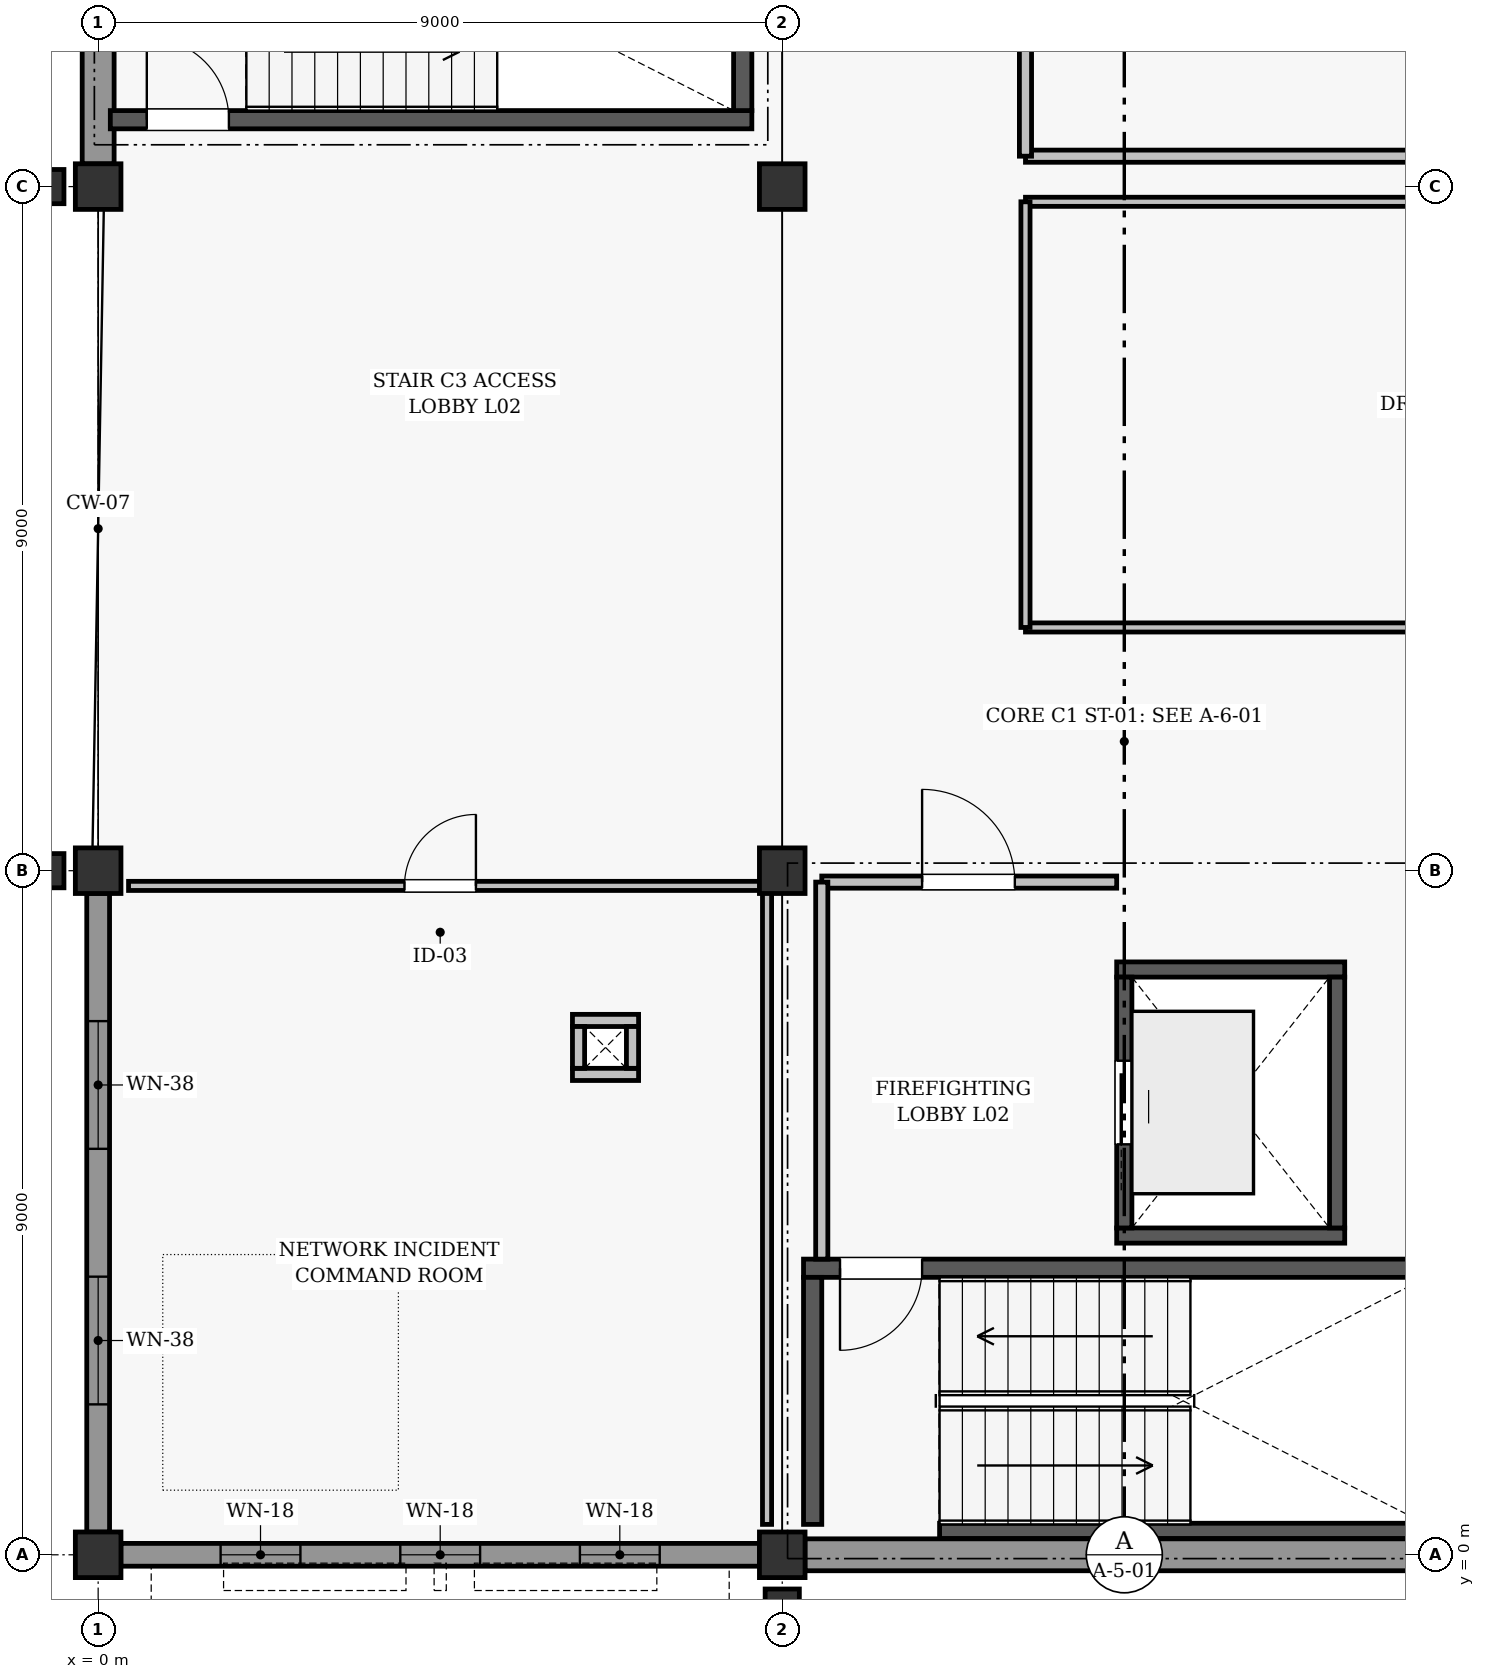
"""IFC4 building model, lengths in metres.
Left out: names, types, materials, properties, quantities, classifications, styles, units other than length and angle.
Written with IfcOpenShell. Run it as: python <this file> out.ifc"""

import sys

from ifc_helpers import new_model, si_unit, direction, frame, frame_2d, origin, origin_2d, place, context, subcontext, project, spatial, rectangle, extrude, element, fill, save


model = new_model("IFC4")
c1 = context("Model", 3, precision=1e-05, world=origin(), true_north=direction((0.0, 1.0)))
c2 = subcontext(c1, "Body", "Model", "MODEL_VIEW")
j1 = project(units=[si_unit("LENGTHUNIT", "METRE"), si_unit("PLANEANGLEUNIT", "RADIAN")], contexts=[c1])
p1 = place(None, origin())
s1 = spatial("IfcSite", under=j1, at=p1, CompositionType="ELEMENT")
p2 = place(p1, origin())
s2 = spatial("IfcBuilding", under=s1, at=p2, CompositionType="ELEMENT")
p3 = place(p2, frame((0.0, 0.0, 8.4)))
s3 = spatial("IfcBuildingStorey", under=s2, at=p3, CompositionType="ELEMENT", Elevation=8.4)
for number, where, z_axis, x_axis in (
    (1, (0.0, 0.0, 0.0), (0.0, 0.0, 1.0), (1.0, 0.0, 0.0)),
    (2, (0.0, 9.0, 0.0), (0.0, 0.0, 1.0), (1.0, 0.0, 0.0)),
    (3, (0.0, 18.0, 0.0), (0.0, 0.0, 1.0), (1.0, 0.0, 0.0)),
    (4, (9.0, 0.0, 0.0), (0.0, 0.0, 1.0), (1.0, 0.0, 0.0)),
    (5, (9.0, 9.0, 0.0), (0.0, 0.0, 1.0), (1.0, 0.0, 0.0)),
    (6, (9.0, 18.0, 0.0), (0.0, 0.0, 1.0), (1.0, 0.0, 0.0)),
):
    element("IfcColumn", number, at=place(p3, frame(where, z_axis=z_axis, x_axis=x_axis)), inside=s3, PredefinedType="COLUMN", context=c2, shape_type="SweptSolid", body=[
        extrude(rectangle(XDim=0.6, YDim=0.6, at=origin_2d()), origin(), (0.0, 0.0, 1.0), 3.6),
    ])
for number, where, z_axis, x_axis in (
    (7, (9.0, -0.75, 0.0), (0.0, 0.0, 1.0), (1.0, 0.0, 0.0)),
    (8, (-0.75, 9.0, 0.0), (0.0, 0.0, 1.0), (0.0, 1.0, 0.0)),
    (9, (-0.75, 18.0, 0.0), (0.0, 0.0, 1.0), (0.0, 1.0, 0.0)),
):
    element("IfcColumn", number, at=place(p3, frame(where, z_axis=z_axis, x_axis=x_axis)), inside=s3, PredefinedType="PILASTER", context=c2, shape_type="SweptSolid", body=[
        extrude(rectangle(XDim=0.45, YDim=0.6, at=origin_2d()), origin(), (0.0, 0.0, 1.0), 3.6),
    ])
p4 = place(p3, frame((0.298, 0.0, 0.0), z_axis=(0.0, 0.0, 1.0), x_axis=(1.0, 0.0, 0.0)))
e10 = element("IfcWall", 10, at=p4, inside=s3, PredefinedType="SOLIDWALL", context=c2, shape_type="SweptSolid", body=[
    extrude(rectangle(XDim=8.404, YDim=0.3, at=frame_2d((4.202, 0.0))), origin(), (0.0, 0.0, 1.0), 2.862),
])
p5 = place(p4, frame((1.313, 0.0, 0.8)))
e11 = element("IfcOpeningElement", 11, at=p5, cuts=e10, PredefinedType="OPENING", context=c2, shape_type="SweptSolid", body=[
    extrude(rectangle(XDim=1.05, YDim=1.88, at=frame_2d((0.525, 0.94))), frame((0.0, 0.16, 0.0), z_axis=(0.0, -1.0, 0.0), x_axis=(1.0, 0.0, 0.0)), (0.0, 0.0, 1.0), 0.32),
])
p6 = place(p4, frame((3.677, 0.0, 0.8)))
e12 = element("IfcOpeningElement", 12, at=p6, cuts=e10, PredefinedType="OPENING", context=c2, shape_type="SweptSolid", body=[
    extrude(rectangle(XDim=1.05, YDim=1.88, at=frame_2d((0.525, 0.94))), frame((0.0, 0.16, 0.0), z_axis=(0.0, -1.0, 0.0), x_axis=(1.0, 0.0, 0.0)), (0.0, 0.0, 1.0), 0.32),
])
p7 = place(p4, frame((6.04, 0.0, 0.8)))
e13 = element("IfcOpeningElement", 13, at=p7, cuts=e10, PredefinedType="OPENING", context=c2, shape_type="SweptSolid", body=[
    extrude(rectangle(XDim=1.05, YDim=1.88, at=frame_2d((0.525, 0.94))), frame((0.0, 0.16, 0.0), z_axis=(0.0, -1.0, 0.0), x_axis=(1.0, 0.0, 0.0)), (0.0, 0.0, 1.0), 0.32),
])
p8 = place(p3, frame((9.298, 0.0, 0.0), z_axis=(0.0, 0.0, 1.0), x_axis=(1.0, 0.0, 0.0)))
e14 = element("IfcWall", 14, at=p8, inside=s3, PredefinedType="SOLIDWALL", context=c2, shape_type="SweptSolid", body=[
    extrude(rectangle(XDim=8.404, YDim=0.42, at=frame_2d((4.202, 0.0))), origin(), (0.0, 0.0, 1.0), 2.862),
])
p9 = place(p3, frame((0.0, 0.298, 0.0), z_axis=(0.0, 0.0, 1.0), x_axis=(0.0, 1.0, 0.0)))
e15 = element("IfcWall", 15, at=p9, inside=s3, PredefinedType="SOLIDWALL", context=c2, shape_type="SweptSolid", body=[
    extrude(rectangle(XDim=8.404, YDim=0.3, at=frame_2d((4.202, 0.0))), origin(), (0.0, 0.0, 1.0), 2.842),
])
p10 = place(p9, frame((1.681, 0.0, 0.85)))
e16 = element("IfcOpeningElement", 16, at=p10, cuts=e15, PredefinedType="OPENING", context=c2, shape_type="SweptSolid", body=[
    extrude(rectangle(XDim=1.68, YDim=1.66, at=frame_2d((0.84, 0.83))), frame((0.0, 0.16, 0.0), z_axis=(0.0, -1.0, 0.0), x_axis=(1.0, 0.0, 0.0)), (0.0, 0.0, 1.0), 0.32),
])
p11 = place(p9, frame((5.043, 0.0, 0.85)))
e17 = element("IfcOpeningElement", 17, at=p11, cuts=e15, PredefinedType="OPENING", context=c2, shape_type="SweptSolid", body=[
    extrude(rectangle(XDim=1.68, YDim=1.66, at=frame_2d((0.84, 0.83))), frame((0.0, 0.16, 0.0), z_axis=(0.0, -1.0, 0.0), x_axis=(1.0, 0.0, 0.0)), (0.0, 0.0, 1.0), 0.32),
])
p12 = place(p3, frame((0.0, 18.298, 0.0), z_axis=(0.0, 0.0, 1.0), x_axis=(0.0, 1.0, 0.0)))
e18 = element("IfcWall", 18, at=p12, inside=s3, PredefinedType="SOLIDWALL", context=c2, shape_type="SweptSolid", body=[
    extrude(rectangle(XDim=8.404, YDim=0.42, at=frame_2d((4.202, 0.0))), origin(), (0.0, 0.0, 1.0), 2.842),
])
p13 = place(p3, frame((11.07, 0.315, 0.0), z_axis=(0.0, 0.0, 1.0), x_axis=(1.0, 0.0, 0.0)))
e19 = element("IfcWall", 19, at=p13, inside=s3, PredefinedType="SHEAR", context=c2, shape_type="SweptSolid", body=[
    extrude(rectangle(XDim=6.41, YDim=0.2, at=frame_2d((3.205, 0.0))), origin(), (0.0, 0.0, 1.0), 3.35),
])
p14 = place(p3, frame((9.28, 3.77, 0.0), z_axis=(0.0, 0.0, 1.0), x_axis=(1.0, 0.0, 0.0)))
e20 = element("IfcWall", 20, at=p14, inside=s3, PredefinedType="SHEAR", context=c2, shape_type="SweptSolid", body=[
    extrude(rectangle(XDim=8.44, YDim=0.24, at=frame_2d((4.22, 0.0))), origin(), (0.0, 0.0, 1.0), 3.35),
])
p15 = place(p14, frame((0.48, 0.0, 0.0)))
e21 = element("IfcOpeningElement", 21, at=p15, cuts=e20, PredefinedType="OPENING", context=c2, shape_type="SweptSolid", body=[
    extrude(rectangle(XDim=1.08, YDim=2.08, at=frame_2d((0.54, 1.04))), frame((0.0, 0.13, 0.0), z_axis=(0.0, -1.0, 0.0), x_axis=(1.0, 0.0, 0.0)), (0.0, 0.0, 1.0), 0.26),
])
p16 = place(p3, frame((9.4, 0.4, 0.0), z_axis=(0.0, 0.0, 1.0), x_axis=(0.0, 1.0, 0.0)))
e22 = element("IfcWall", 22, at=p16, inside=s3, PredefinedType="SHEAR", context=c2, shape_type="SweptSolid", body=[
    extrude(rectangle(XDim=3.25, YDim=0.24, at=frame_2d((1.625, 0.0))), origin(), (0.0, 0.0, 1.0), 3.35),
])
p17 = place(p3, frame((0.16, 18.88, 0.0), z_axis=(0.0, 0.0, 1.0), x_axis=(1.0, 0.0, 0.0)))
e23 = element("IfcWall", 23, at=p17, inside=s3, PredefinedType="SHEAR", context=c2, shape_type="SweptSolid", body=[
    extrude(rectangle(XDim=8.44, YDim=0.24, at=frame_2d((4.22, 0.0))), origin(), (0.0, 0.0, 1.0), 3.35),
])
p18 = place(p17, frame((0.48, 0.0, 0.0)))
e24 = element("IfcOpeningElement", 24, at=p18, cuts=e23, PredefinedType="OPENING", context=c2, shape_type="SweptSolid", body=[
    extrude(rectangle(XDim=1.08, YDim=2.08, at=frame_2d((0.54, 1.04))), frame((0.0, 0.13, 0.0), z_axis=(0.0, -1.0, 0.0), x_axis=(1.0, 0.0, 0.0)), (0.0, 0.0, 1.0), 0.26),
])
p19 = place(p3, frame((8.48, 19.0, 0.0), z_axis=(0.0, 0.0, 1.0), x_axis=(0.0, 1.0, 0.0)))
e25 = element("IfcWall", 25, at=p19, inside=s3, PredefinedType="SHEAR", context=c2, shape_type="SweptSolid", body=[
    extrude(rectangle(XDim=3.25, YDim=0.24, at=frame_2d((1.625, 0.0))), origin(), (0.0, 0.0, 1.0), 3.35),
])
for number, where, z_axis, x_axis in (
    (26, (13.4, 4.2, 0.0), (0.0, 0.0, 1.0), (1.0, 0.0, 0.0)),
    (27, (13.4, 7.7, 0.0), (0.0, 0.0, 1.0), (1.0, 0.0, 0.0)),
):
    element("IfcWall", number, at=place(p3, frame(where, z_axis=z_axis, x_axis=x_axis)), inside=s3, PredefinedType="SHEAR", context=c2, shape_type="SweptSolid", body=[
        extrude(rectangle(XDim=3.0, YDim=0.2, at=frame_2d((1.5, 0.0))), origin(), (0.0, 0.0, 1.0), 3.35),
    ])
p20 = place(p3, frame((13.5, 4.3, 0.0), z_axis=(0.0, 0.0, 1.0), x_axis=(0.0, 1.0, 0.0)))
e28 = element("IfcWall", 28, at=p20, inside=s3, PredefinedType="SHEAR", context=c2, shape_type="SweptSolid", body=[
    extrude(rectangle(XDim=3.3, YDim=0.2, at=frame_2d((1.65, 0.0))), origin(), (0.0, 0.0, 1.0), 3.35),
])
p21 = place(p20, frame((1.1, 0.0, 0.0)))
e29 = element("IfcOpeningElement", 29, at=p21, cuts=e28, PredefinedType="OPENING", context=c2, shape_type="SweptSolid", body=[
    extrude(rectangle(XDim=1.1, YDim=2.1, at=frame_2d((0.55, 1.05))), frame((0.0, 0.11, 0.0), z_axis=(0.0, -1.0, 0.0), x_axis=(1.0, 0.0, 0.0)), (0.0, 0.0, 1.0), 0.22),
])
p22 = place(p3, frame((16.3, 4.3, 0.0), z_axis=(0.0, 0.0, 1.0), x_axis=(0.0, 1.0, 0.0)))
e30 = element("IfcWall", 30, at=p22, inside=s3, PredefinedType="SHEAR", context=c2, shape_type="SweptSolid", body=[
    extrude(rectangle(XDim=3.3, YDim=0.2, at=frame_2d((1.65, 0.0))), origin(), (0.0, 0.0, 1.0), 3.35),
])
for number, where, z_axis, x_axis in (
    (31, (6.24, 6.32, 0.0), (0.0, 0.0, 1.0), (1.0, 0.0, 0.0)),
    (32, (6.24, 7.03, 0.0), (0.0, 0.0, 1.0), (1.0, 0.0, 0.0)),
):
    element("IfcWall", number, at=place(p3, frame(where, z_axis=z_axis, x_axis=x_axis)), inside=s3, PredefinedType="PARTITIONING", context=c2, shape_type="SweptSolid", body=[
        extrude(rectangle(XDim=0.87, YDim=0.16, at=frame_2d((0.435, 0.0))), origin(), (0.0, 0.0, 1.0), 3.35),
    ])
for number, where, z_axis, x_axis in (
    (33, (6.32, 6.4, 0.0), (0.0, 0.0, 1.0), (0.0, 1.0, 0.0)),
    (34, (7.03, 6.4, 0.0), (0.0, 0.0, 1.0), (0.0, 1.0, 0.0)),
):
    element("IfcWall", number, at=place(p3, frame(where, z_axis=z_axis, x_axis=x_axis)), inside=s3, PredefinedType="PARTITIONING", context=c2, shape_type="SweptSolid", body=[
        extrude(rectangle(XDim=0.55, YDim=0.16, at=frame_2d((0.275, 0.0))), origin(), (0.0, 0.0, 1.0), 3.35),
    ])
p23 = place(p3, frame((9.52, 8.85, 0.0), z_axis=(0.0, 0.0, 1.0), x_axis=(1.0, 0.0, 0.0)))
e35 = element("IfcWall", 35, at=p23, inside=s3, PredefinedType="PARTITIONING", context=c2, shape_type="SweptSolid", body=[
    extrude(rectangle(XDim=3.88, YDim=0.16, at=frame_2d((1.94, 0.0))), origin(), (0.0, 0.0, 1.0), 2.845),
])
p24 = place(p23, frame((1.32, 0.0, 0.0)))
e36 = element("IfcOpeningElement", 36, at=p24, cuts=e35, PredefinedType="OPENING", context=c2, shape_type="SweptSolid", body=[
    extrude(rectangle(XDim=1.22, YDim=2.12, at=frame_2d((0.61, 1.06))), frame((0.0, 0.09, 0.0), z_axis=(0.0, -1.0, 0.0), x_axis=(1.0, 0.0, 0.0)), (0.0, 0.0, 1.0), 0.18),
])
p25 = place(p3, frame((9.52, 3.89, 0.0), z_axis=(0.0, 0.0, 1.0), x_axis=(0.0, 1.0, 0.0)))
e37 = element("IfcWall", 37, at=p25, inside=s3, PredefinedType="PARTITIONING", context=c2, shape_type="SweptSolid", body=[
    extrude(rectangle(XDim=4.96, YDim=0.16, at=frame_2d((2.48, 0.0))), origin(), (0.0, 0.0, 1.0), 2.845),
])
p26 = place(p3, frame((0.4, 8.8, 0.0), z_axis=(0.0, 0.0, 1.0), x_axis=(1.0, 0.0, 0.0)))
e38 = element("IfcWall", 38, at=p26, inside=s3, PredefinedType="PARTITIONING", context=c2, shape_type="SweptSolid", body=[
    extrude(rectangle(XDim=8.4, YDim=0.12, at=frame_2d((4.2, 0.0))), origin(), (0.0, 0.0, 1.0), 2.845),
])
p27 = place(p26, frame((3.63, 0.0, 0.0)))
e39 = element("IfcOpeningElement", 39, at=p27, cuts=e38, PredefinedType="OPENING", context=c2, shape_type="SweptSolid", body=[
    extrude(rectangle(XDim=0.94, YDim=2.06, at=frame_2d((0.47, 1.03))), frame((0.0, 0.07, 0.0), z_axis=(0.0, -1.0, 0.0), x_axis=(1.0, 0.0, 0.0)), (0.0, 0.0, 1.0), 0.14),
])
p28 = place(p3, frame((8.8, 0.4, 0.0), z_axis=(0.0, 0.0, 1.0), x_axis=(0.0, 1.0, 0.0)))
e40 = element("IfcWall", 40, at=p28, inside=s3, PredefinedType="PARTITIONING", context=c2, shape_type="SweptSolid", body=[
    extrude(rectangle(XDim=8.4, YDim=0.12, at=frame_2d((4.2, 0.0))), origin(), (0.0, 0.0, 1.0), 2.845),
])
p29 = place(p3, frame((12.2, 12.2, 0.0), z_axis=(0.0, 0.0, 1.0), x_axis=(1.0, 0.0, 0.0)))
e41 = element("IfcWall", 41, at=p29, inside=s3, PredefinedType="PARTITIONING", context=c2, shape_type="SweptSolid", body=[
    extrude(rectangle(XDim=23.4, YDim=0.12, at=frame_2d((11.7, 0.0))), origin(), (0.0, 0.0, 1.0), 2.895),
])
p30 = place(p29, frame((9.43, 0.0, 0.0)))
e42 = element("IfcOpeningElement", 42, at=p30, cuts=e41, PredefinedType="OPENING", context=c2, shape_type="SweptSolid", body=[
    extrude(rectangle(XDim=1.74, YDim=2.18, at=frame_2d((0.87, 1.09))), frame((0.0, 0.07, 0.0), z_axis=(0.0, -1.0, 0.0), x_axis=(1.0, 0.0, 0.0)), (0.0, 0.0, 1.0), 0.14),
])
p31 = place(p3, frame((12.2, 17.8, 0.0), z_axis=(0.0, 0.0, 1.0), x_axis=(1.0, 0.0, 0.0)))
e43 = element("IfcWall", 43, at=p31, inside=s3, PredefinedType="PARTITIONING", context=c2, shape_type="SweptSolid", body=[
    extrude(rectangle(XDim=23.4, YDim=0.12, at=frame_2d((11.7, 0.0))), origin(), (0.0, 0.0, 1.0), 2.845),
])
p32 = place(p3, frame((12.2, 12.2, 0.0), z_axis=(0.0, 0.0, 1.0), x_axis=(0.0, 1.0, 0.0)))
e44 = element("IfcWall", 44, at=p32, inside=s3, PredefinedType="PARTITIONING", context=c2, shape_type="SweptSolid", body=[
    extrude(rectangle(XDim=5.6, YDim=0.12, at=frame_2d((2.8, 0.0))), origin(), (0.0, 0.0, 1.0), 2.845),
])
p33 = place(p3, frame((12.2, 18.4, 0.0), z_axis=(0.0, 0.0, 1.0), x_axis=(1.0, 0.0, 0.0)))
e45 = element("IfcWall", 45, at=p33, inside=s3, PredefinedType="PARTITIONING", context=c2, shape_type="SweptSolid", body=[
    extrude(rectangle(XDim=41.4, YDim=0.16, at=frame_2d((20.7, 0.0))), origin(), (0.0, 0.0, 1.0), 2.895),
])
p34 = place(p3, frame((12.2, 18.4, 0.0), z_axis=(0.0, 0.0, 1.0), x_axis=(0.0, 1.0, 0.0)))
e46 = element("IfcWall", 46, at=p34, inside=s3, PredefinedType="PARTITIONING", context=c2, shape_type="SweptSolid", body=[
    extrude(rectangle(XDim=8.2, YDim=0.16, at=frame_2d((4.1, 0.0))), origin(), (0.0, 0.0, 1.0), 3.35),
])
p35 = place(p34, frame((3.59, 0.0, 0.0)))
e47 = element("IfcOpeningElement", 47, at=p35, cuts=e46, PredefinedType="OPENING", context=c2, shape_type="SweptSolid", body=[
    extrude(rectangle(XDim=1.02, YDim=2.1, at=frame_2d((0.51, 1.05))), frame((0.0, 0.09, 0.0), z_axis=(0.0, -1.0, 0.0), x_axis=(1.0, 0.0, 0.0)), (0.0, 0.0, 1.0), 0.18),
])
p36 = place(p5, origin())
e48 = element("IfcWindow", 48, at=p36, inside=s3, PartitioningType="SINGLE_PANEL", PredefinedType="WINDOW", context=c2, shape_type="SweptSolid", body=[
    extrude(rectangle(XDim=1.05, YDim=1.88, at=frame_2d((0.525, 0.94))), frame((0.0, 0.03, 0.0), z_axis=(0.0, -1.0, 0.0), x_axis=(1.0, 0.0, 0.0)), (0.0, 0.0, 1.0), 0.06),
])
fill(e11, e48)
p37 = place(p6, origin())
e49 = element("IfcWindow", 49, at=p37, inside=s3, PartitioningType="SINGLE_PANEL", PredefinedType="WINDOW", context=c2, shape_type="SweptSolid", body=[
    extrude(rectangle(XDim=1.05, YDim=1.88, at=frame_2d((0.525, 0.94))), frame((0.0, 0.03, 0.0), z_axis=(0.0, -1.0, 0.0), x_axis=(1.0, 0.0, 0.0)), (0.0, 0.0, 1.0), 0.06),
])
fill(e12, e49)
p38 = place(p7, origin())
e50 = element("IfcWindow", 50, at=p38, inside=s3, PartitioningType="SINGLE_PANEL", PredefinedType="WINDOW", context=c2, shape_type="SweptSolid", body=[
    extrude(rectangle(XDim=1.05, YDim=1.88, at=frame_2d((0.525, 0.94))), frame((0.0, 0.03, 0.0), z_axis=(0.0, -1.0, 0.0), x_axis=(1.0, 0.0, 0.0)), (0.0, 0.0, 1.0), 0.06),
])
fill(e13, e50)
p39 = place(p10, origin())
e51 = element("IfcWindow", 51, at=p39, inside=s3, PartitioningType="SINGLE_PANEL", PredefinedType="WINDOW", context=c2, shape_type="SweptSolid", body=[
    extrude(rectangle(XDim=1.68, YDim=1.66, at=frame_2d((0.84, 0.83))), frame((0.0, 0.03, 0.0), z_axis=(0.0, -1.0, 0.0), x_axis=(1.0, 0.0, 0.0)), (0.0, 0.0, 1.0), 0.06),
])
fill(e16, e51)
p40 = place(p11, origin())
e52 = element("IfcWindow", 52, at=p40, inside=s3, PartitioningType="SINGLE_PANEL", PredefinedType="WINDOW", context=c2, shape_type="SweptSolid", body=[
    extrude(rectangle(XDim=1.68, YDim=1.66, at=frame_2d((0.84, 0.83))), frame((0.0, 0.03, 0.0), z_axis=(0.0, -1.0, 0.0), x_axis=(1.0, 0.0, 0.0)), (0.0, 0.0, 1.0), 0.06),
])
fill(e17, e52)
p41 = place(p15, frame((1.08, 0.0, 0.0), z_axis=(0.0, 0.0, 1.0), x_axis=(-1.0, 0.0, 0.0)))
e53 = element("IfcDoor", 53, at=p41, inside=s3, OperationType="SINGLE_SWING_LEFT", PredefinedType="DOOR", context=c2, shape_type="SweptSolid", body=[
    extrude(rectangle(XDim=1.08, YDim=2.08, at=frame_2d((0.54, 1.04))), frame((0.0, 0.025, 0.0), z_axis=(0.0, -1.0, 0.0), x_axis=(1.0, 0.0, 0.0)), (0.0, 0.0, 1.0), 0.05),
])
fill(e21, e53)
p42 = place(p18, origin())
e54 = element("IfcDoor", 54, at=p42, inside=s3, OperationType="SINGLE_SWING_LEFT", PredefinedType="DOOR", context=c2, shape_type="SweptSolid", body=[
    extrude(rectangle(XDim=1.08, YDim=2.08, at=frame_2d((0.54, 1.04))), frame((0.0, 0.025, 0.0), z_axis=(0.0, -1.0, 0.0), x_axis=(1.0, 0.0, 0.0)), (0.0, 0.0, 1.0), 0.05),
])
fill(e24, e54)
p43 = place(p21, origin())
e55 = element("IfcDoor", 55, at=p43, inside=s3, OperationType="SLIDING_TO_LEFT", PredefinedType="DOOR", context=c2, shape_type="SweptSolid", body=[
    extrude(rectangle(XDim=1.1, YDim=2.1, at=frame_2d((0.55, 1.05))), frame((0.0, 0.025, 0.0), z_axis=(0.0, -1.0, 0.0), x_axis=(1.0, 0.0, 0.0)), (0.0, 0.0, 1.0), 0.05),
])
fill(e29, e55)
p44 = place(p24, origin())
e56 = element("IfcDoor", 56, at=p44, inside=s3, OperationType="SINGLE_SWING_LEFT", PredefinedType="DOOR", context=c2, shape_type="SweptSolid", body=[
    extrude(rectangle(XDim=1.22, YDim=2.12, at=frame_2d((0.61, 1.06))), frame((0.0, 0.025, 0.0), z_axis=(0.0, -1.0, 0.0), x_axis=(1.0, 0.0, 0.0)), (0.0, 0.0, 1.0), 0.05),
])
fill(e36, e56)
p45 = place(p27, origin())
e57 = element("IfcDoor", 57, at=p45, inside=s3, OperationType="SINGLE_SWING_RIGHT", PredefinedType="DOOR", context=c2, shape_type="SweptSolid", body=[
    extrude(rectangle(XDim=0.94, YDim=2.06, at=frame_2d((0.47, 1.03))), frame((0.0, 0.025, 0.0), z_axis=(0.0, -1.0, 0.0), x_axis=(1.0, 0.0, 0.0)), (0.0, 0.0, 1.0), 0.05),
])
fill(e39, e57)
save(model, sys.argv[1])
